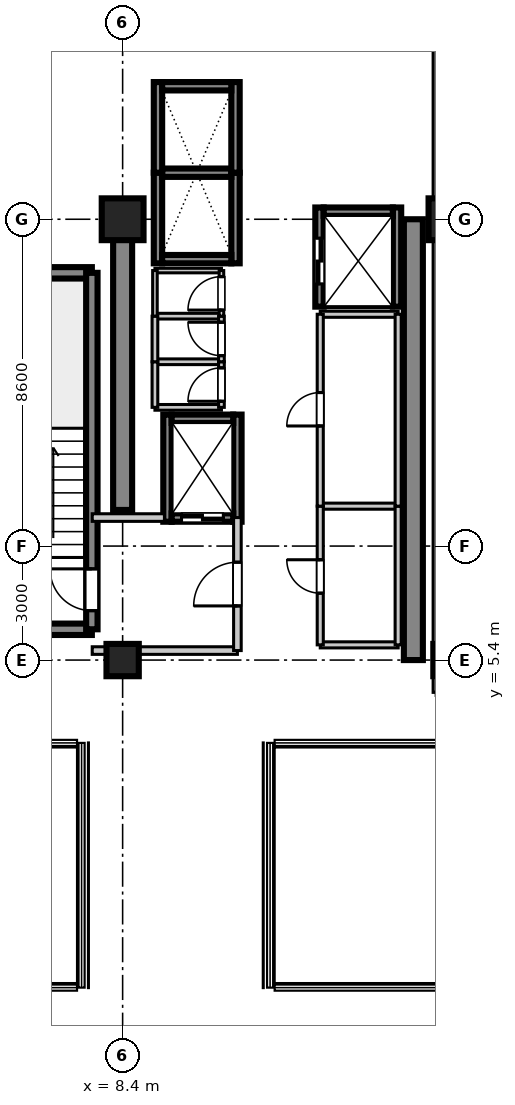
"""IFC4 building model, lengths in metres.
Left out: names, types, materials, properties, quantities, classifications, styles, units other than length and angle.
Written with IfcOpenShell. Run it as: python <this file> out.ifc"""

import sys

from ifc_helpers import new_model, si_unit, direction, frame, frame_2d, origin, origin_2d, place, context, subcontext, project, spatial, rectangle, extrude, source, transform, mapped, element, fill, save


model = new_model("IFC4")
c1 = context("Model", 3, precision=1e-05, world=origin(), true_north=direction((0.0, 1.0)))
c2 = subcontext(c1, "Body", "Model", "MODEL_VIEW")
j1 = project(units=[si_unit("LENGTHUNIT", "METRE"), si_unit("PLANEANGLEUNIT", "RADIAN")], contexts=[c1])
p1 = place(None, origin())
s1 = spatial("IfcSite", under=j1, at=p1, CompositionType="ELEMENT")
p2 = place(p1, origin())
s2 = spatial("IfcBuilding", under=s1, at=p2, CompositionType="ELEMENT")
p3 = place(p2, frame((0.0, 0.0, 178.2)))
s3 = spatial("IfcBuildingStorey", under=s2, at=p3, CompositionType="ELEMENT", Elevation=178.2)
m1 = source(origin(), c2, "Body", "SweptSolid", [
    extrude(rectangle(XDim=0.85, YDim=0.85, at=origin_2d()), origin(), (0.0, 0.0, 1.0), 3.605),
])
p4 = place(p3, frame((8.4, 5.4, 0.0), z_axis=(0.0, 0.0, 1.0), x_axis=(1.0, 0.0, 0.0)))
e1 = element("IfcColumn", 1, at=p4, inside=s3, PredefinedType="PILASTER", context=c2, shape_type="MappedRepresentation", body=[
    mapped(m1, transform((0.0, 0.0, 0.0), scale=1.0)),
])
m2 = source(origin(), c2, "Body", "SweptSolid", [
    extrude(rectangle(XDim=1.1, YDim=1.1, at=origin_2d()), origin(), (0.0, 0.0, 1.0), 3.605),
])
p5 = place(p3, frame((8.4, 17.0, 0.0), z_axis=(0.0, 0.0, 1.0), x_axis=(1.0, 0.0, 0.0)))
e2 = element("IfcColumn", 2, at=p5, inside=s3, PredefinedType="COLUMN", context=c2, shape_type="MappedRepresentation", body=[
    mapped(m2, transform((0.0, 0.0, 0.0), scale=1.0)),
])
p6 = place(p3, frame((17.0, 5.4, 0.0), z_axis=(0.0, 0.0, 1.0), x_axis=(1.0, 0.0, 0.0)))
e3 = element("IfcColumn", 3, at=p6, inside=s3, PredefinedType="PILASTER", context=c2, shape_type="MappedRepresentation", body=[
    mapped(m1, transform((0.0, 0.0, 0.0), scale=1.0)),
])
p7 = place(p3, frame((17.0, 17.0, 0.0), z_axis=(0.0, 0.0, 1.0), x_axis=(1.0, 0.0, 0.0)))
e4 = element("IfcColumn", 4, at=p7, inside=s3, PredefinedType="COLUMN", context=c2, shape_type="MappedRepresentation", body=[
    mapped(m2, transform((0.0, 0.0, 0.0), scale=1.0)),
])
m3 = source(origin(), c2, "Body", "SweptSolid", [
    extrude(rectangle(XDim=7.65, YDim=0.5, at=frame_2d((3.825, 0.0))), origin(), (0.0, 0.0, 1.0), 3.39),
])
p8 = place(p3, frame((8.4, 9.35, 0.0), z_axis=(0.0, 0.0, 1.0), x_axis=(0.0, 1.0, 0.0)))
e5 = element("IfcWall", 5, at=p8, inside=s3, PredefinedType="SHEAR", context=c2, shape_type="MappedRepresentation", body=[
    mapped(m3, transform((0.0, 0.0, 0.0), scale=1.0)),
])
m4 = source(origin(), c2, "Body", "SweptSolid", [
    extrude(rectangle(XDim=11.6, YDim=0.5, at=frame_2d((5.8, 0.0))), origin(), (0.0, 0.0, 1.0), 3.39),
])
p9 = place(p3, frame((16.05, 5.4, 0.0), z_axis=(0.0, 0.0, 1.0), x_axis=(0.0, 1.0, 0.0)))
e6 = element("IfcWall", 6, at=p9, inside=s3, PredefinedType="SHEAR", context=c2, shape_type="MappedRepresentation", body=[
    mapped(m4, transform((0.0, 0.0, 0.0), scale=1.0)),
])
m5 = source(origin(), c2, "Body", "SweptSolid", [
    extrude(rectangle(XDim=3.98, YDim=0.3, at=frame_2d((1.99, 0.0))), origin(), (0.0, 0.0, 1.0), 3.39),
])
for number, where, z_axis, x_axis in (
    (7, (3.61, 6.21, 0.0), (0.0, 0.0, 1.0), (1.0, 0.0, 0.0)),
    (8, (3.61, 15.59, 0.0), (0.0, 0.0, 1.0), (1.0, 0.0, 0.0)),
):
    element("IfcWall", number, at=place(p3, frame(where, z_axis=z_axis, x_axis=x_axis)), inside=s3, PredefinedType="SHEAR", context=c2, shape_type="MappedRepresentation", body=[
        mapped(m5, transform((0.0, 0.0, 0.0), scale=1.0)),
    ])
m6 = source(origin(), c2, "Body", "SweptSolid", [
    extrude(rectangle(XDim=9.38, YDim=0.3, at=frame_2d((4.69, 0.0))), origin(), (0.0, 0.0, 1.0), 3.39),
])
p10 = place(p3, frame((7.59, 6.21, 0.0), z_axis=(0.0, 0.0, 1.0), x_axis=(0.0, 1.0, 0.0)))
e9 = element("IfcWall", 9, at=p10, inside=s3, PredefinedType="SHEAR", context=c2, shape_type="MappedRepresentation", body=[
    mapped(m6, transform((0.0, 0.0, 0.0), scale=1.0)),
])
p11 = place(p10, frame((0.49, 0.0, 0.0)))
e10 = element("IfcOpeningElement", 10, at=p11, cuts=e9, PredefinedType="OPENING", context=c2, shape_type="SweptSolid", body=[
    extrude(rectangle(XDim=1.1, YDim=2.15, at=frame_2d((0.55, 1.075))), frame((0.0, 0.16, 0.0), z_axis=(0.0, -1.0, 0.0), x_axis=(1.0, 0.0, 0.0)), (0.0, 0.0, 1.0), 0.32),
])
m7 = source(origin(), c2, "Body", "SweptSolid", [
    extrude(rectangle(XDim=2.385, YDim=0.22, at=frame_2d((1.192, 0.0))), origin(), (0.0, 0.0, 1.0), 3.39),
])
for number, where, z_axis, x_axis in (
    (11, (9.33, 15.84, 0.0), (0.0, 0.0, 1.0), (0.0, 1.0, 0.0)),
    (12, (11.37, 15.84, 0.0), (0.0, 0.0, 1.0), (0.0, 1.0, 0.0)),
):
    element("IfcWall", number, at=place(p3, frame(where, z_axis=z_axis, x_axis=x_axis)), inside=s3, PredefinedType="SHEAR", context=c2, shape_type="MappedRepresentation", body=[
        mapped(m7, transform((0.0, 0.0, 0.0), scale=1.0)),
    ])
m8 = source(origin(), c2, "Body", "SweptSolid", [
    extrude(rectangle(XDim=1.82, YDim=0.22, at=frame_2d((0.91, 0.0))), origin(), (0.0, 0.0, 1.0), 3.39),
])
p12 = place(p3, frame((9.44, 15.95, 0.0), z_axis=(0.0, 0.0, 1.0), x_axis=(1.0, 0.0, 0.0)))
e13 = element("IfcWall", 13, at=p12, inside=s3, PredefinedType="SHEAR", context=c2, shape_type="MappedRepresentation", body=[
    mapped(m8, transform((0.0, 0.0, 0.0), scale=1.0)),
])
m9 = source(origin(), c2, "Body", "SweptSolid", [
    extrude(rectangle(XDim=1.82, YDim=0.22, at=frame_2d((0.91, 0.0))), origin(), (0.0, 0.0, 1.0), 3.65),
])
p13 = place(p3, frame((9.44, 18.225, 0.0), z_axis=(0.0, 0.0, 1.0), x_axis=(1.0, 0.0, 0.0)))
e14 = element("IfcWall", 14, at=p13, inside=s3, PredefinedType="SHEAR", context=c2, shape_type="MappedRepresentation", body=[
    mapped(m9, transform((0.0, 0.0, 0.0), scale=1.0)),
])
for number, where, z_axis, x_axis in (
    (15, (9.33, 18.225, 0.0), (0.0, 0.0, 1.0), (0.0, 1.0, 0.0)),
    (16, (11.37, 18.225, 0.0), (0.0, 0.0, 1.0), (0.0, 1.0, 0.0)),
):
    element("IfcWall", number, at=place(p3, frame(where, z_axis=z_axis, x_axis=x_axis)), inside=s3, PredefinedType="SHEAR", context=c2, shape_type="MappedRepresentation", body=[
        mapped(m7, transform((0.0, 0.0, 0.0), scale=1.0)),
    ])
p14 = place(p3, frame((9.44, 20.5, 0.0), z_axis=(0.0, 0.0, 1.0), x_axis=(1.0, 0.0, 0.0)))
e17 = element("IfcWall", 17, at=p14, inside=s3, PredefinedType="SHEAR", context=c2, shape_type="MappedRepresentation", body=[
    mapped(m8, transform((0.0, 0.0, 0.0), scale=1.0)),
])
m10 = source(origin(), c2, "Body", "SweptSolid", [
    extrude(rectangle(XDim=2.82, YDim=0.22, at=frame_2d((1.41, 0.0))), origin(), (0.0, 0.0, 1.0), 3.39),
])
for number, where, z_axis, x_axis in (
    (18, (9.58, 9.04, 0.0), (0.0, 0.0, 1.0), (0.0, 1.0, 0.0)),
    (19, (11.42, 9.04, 0.0), (0.0, 0.0, 1.0), (0.0, 1.0, 0.0)),
):
    element("IfcWall", number, at=place(p3, frame(where, z_axis=z_axis, x_axis=x_axis)), inside=s3, PredefinedType="SHEAR", context=c2, shape_type="MappedRepresentation", body=[
        mapped(m10, transform((0.0, 0.0, 0.0), scale=1.0)),
    ])
m11 = source(origin(), c2, "Body", "SweptSolid", [
    extrude(rectangle(XDim=1.62, YDim=0.22, at=frame_2d((0.81, 0.0))), origin(), (0.0, 0.0, 1.0), 3.39),
])
p15 = place(p3, frame((9.69, 9.15, 0.0), z_axis=(0.0, 0.0, 1.0), x_axis=(1.0, 0.0, 0.0)))
e20 = element("IfcWall", 20, at=p15, inside=s3, PredefinedType="SHEAR", context=c2, shape_type="MappedRepresentation", body=[
    mapped(m11, transform((0.0, 0.0, 0.0), scale=1.0)),
])
p16 = place(p15, frame((0.26, 0.0, 0.0)))
e21 = element("IfcOpeningElement", 21, at=p16, cuts=e20, PredefinedType="OPENING", context=c2, shape_type="SweptSolid", body=[
    extrude(rectangle(XDim=1.1, YDim=2.2, at=frame_2d((0.55, 1.1))), frame((0.0, 0.12, 0.0), z_axis=(0.0, -1.0, 0.0), x_axis=(1.0, 0.0, 0.0)), (0.0, 0.0, 1.0), 0.24),
])
p17 = place(p3, frame((9.69, 11.75, 0.0), z_axis=(0.0, 0.0, 1.0), x_axis=(1.0, 0.0, 0.0)))
e22 = element("IfcWall", 22, at=p17, inside=s3, PredefinedType="SHEAR", context=c2, shape_type="MappedRepresentation", body=[
    mapped(m11, transform((0.0, 0.0, 0.0), scale=1.0)),
])
m12 = source(origin(), c2, "Body", "SweptSolid", [
    extrude(rectangle(XDim=2.61, YDim=0.22, at=frame_2d((1.305, 0.0))), origin(), (0.0, 0.0, 1.0), 3.39),
])
p18 = place(p3, frame((13.58, 14.7, 0.0), z_axis=(0.0, 0.0, 1.0), x_axis=(0.0, 1.0, 0.0)))
e23 = element("IfcWall", 23, at=p18, inside=s3, PredefinedType="SHEAR", context=c2, shape_type="MappedRepresentation", body=[
    mapped(m12, transform((0.0, 0.0, 0.0), scale=1.0)),
])
p19 = place(p18, frame((0.6, 0.0, 0.0)))
e24 = element("IfcOpeningElement", 24, at=p19, cuts=e23, PredefinedType="OPENING", context=c2, shape_type="SweptSolid", body=[
    extrude(rectangle(XDim=1.2, YDim=2.2, at=frame_2d((0.6, 1.1))), frame((0.0, 0.12, 0.0), z_axis=(0.0, -1.0, 0.0), x_axis=(1.0, 0.0, 0.0)), (0.0, 0.0, 1.0), 0.24),
])
p20 = place(p3, frame((15.62, 14.7, 0.0), z_axis=(0.0, 0.0, 1.0), x_axis=(0.0, 1.0, 0.0)))
e25 = element("IfcWall", 25, at=p20, inside=s3, PredefinedType="SHEAR", context=c2, shape_type="MappedRepresentation", body=[
    mapped(m12, transform((0.0, 0.0, 0.0), scale=1.0)),
])
p21 = place(p3, frame((13.69, 17.2, 0.0), z_axis=(0.0, 0.0, 1.0), x_axis=(1.0, 0.0, 0.0)))
e26 = element("IfcWall", 26, at=p21, inside=s3, PredefinedType="SHEAR", context=c2, shape_type="MappedRepresentation", body=[
    mapped(m8, transform((0.0, 0.0, 0.0), scale=1.0)),
])
m13 = source(origin(), c2, "Body", "SweptSolid", [
    extrude(rectangle(XDim=3.82, YDim=0.2, at=frame_2d((1.91, 0.0))), origin(), (0.0, 0.0, 1.0), 2.73),
])
p22 = place(p3, frame((7.6, 5.65, 0.0), z_axis=(0.0, 0.0, 1.0), x_axis=(1.0, 0.0, 0.0)))
e27 = element("IfcWall", 27, at=p22, inside=s3, PredefinedType="PARTITIONING", context=c2, shape_type="MappedRepresentation", body=[
    mapped(m13, transform((0.0, 0.0, 0.0), scale=1.0)),
])
m14 = source(origin(), c2, "Body", "SweptSolid", [
    extrude(rectangle(XDim=1.9, YDim=0.2, at=frame_2d((0.95, 0.0))), origin(), (0.0, 0.0, 1.0), 2.73),
])
p23 = place(p3, frame((7.6, 9.15, 0.0), z_axis=(0.0, 0.0, 1.0), x_axis=(1.0, 0.0, 0.0)))
e28 = element("IfcWall", 28, at=p23, inside=s3, PredefinedType="PARTITIONING", context=c2, shape_type="MappedRepresentation", body=[
    mapped(m14, transform((0.0, 0.0, 0.0), scale=1.0)),
])
m15 = source(origin(), c2, "Body", "SweptSolid", [
    extrude(rectangle(XDim=3.5, YDim=0.2, at=frame_2d((1.75, 0.0))), origin(), (0.0, 0.0, 1.0), 2.73),
])
p24 = place(p3, frame((11.42, 5.65, 0.0), z_axis=(0.0, 0.0, 1.0), x_axis=(0.0, 1.0, 0.0)))
e29 = element("IfcWall", 29, at=p24, inside=s3, PredefinedType="PARTITIONING", context=c2, shape_type="MappedRepresentation", body=[
    mapped(m15, transform((0.0, 0.0, 0.0), scale=1.0)),
])
p25 = place(p24, frame((1.175, 0.0, 0.0)))
e30 = element("IfcOpeningElement", 30, at=p25, cuts=e29, PredefinedType="OPENING", context=c2, shape_type="SweptSolid", body=[
    extrude(rectangle(XDim=1.15, YDim=2.15, at=frame_2d((0.575, 1.075))), frame((0.0, 0.11, 0.0), z_axis=(0.0, -1.0, 0.0), x_axis=(1.0, 0.0, 0.0)), (0.0, 0.0, 1.0), 0.22),
])
m16 = source(origin(), c2, "Body", "SweptSolid", [
    extrude(rectangle(XDim=1.75, YDim=0.15, at=frame_2d((0.875, 0.0))), origin(), (0.0, 0.0, 1.0), 2.73),
])
for number, where, z_axis, x_axis in (
    (31, (9.25, 12.05, 0.0), (0.0, 0.0, 1.0), (1.0, 0.0, 0.0)),
    (32, (9.25, 13.25, 0.0), (0.0, 0.0, 1.0), (1.0, 0.0, 0.0)),
):
    element("IfcWall", number, at=place(p3, frame(where, z_axis=z_axis, x_axis=x_axis)), inside=s3, PredefinedType="PARTITIONING", context=c2, shape_type="MappedRepresentation", body=[
        mapped(m16, transform((0.0, 0.0, 0.0), scale=1.0)),
    ])
m17 = source(origin(), c2, "Body", "SweptSolid", [
    extrude(rectangle(XDim=1.2, YDim=0.15, at=frame_2d((0.6, 0.0))), origin(), (0.0, 0.0, 1.0), 2.73),
])
p26 = place(p3, frame((9.25, 12.05, 0.0), z_axis=(0.0, 0.0, 1.0), x_axis=(0.0, 1.0, 0.0)))
e33 = element("IfcWall", 33, at=p26, inside=s3, PredefinedType="PARTITIONING", context=c2, shape_type="MappedRepresentation", body=[
    mapped(m17, transform((0.0, 0.0, 0.0), scale=1.0)),
])
p27 = place(p3, frame((11.0, 12.05, 0.0), z_axis=(0.0, 0.0, 1.0), x_axis=(0.0, 1.0, 0.0)))
e34 = element("IfcWall", 34, at=p27, inside=s3, PredefinedType="PARTITIONING", context=c2, shape_type="MappedRepresentation", body=[
    mapped(m17, transform((0.0, 0.0, 0.0), scale=1.0)),
])
p28 = place(p27, frame((0.16, 0.0, 0.0)))
e35 = element("IfcOpeningElement", 35, at=p28, cuts=e34, PredefinedType="OPENING", context=c2, shape_type="SweptSolid", body=[
    extrude(rectangle(XDim=0.88, YDim=2.1, at=frame_2d((0.44, 1.05))), frame((0.0, 0.085, 0.0), z_axis=(0.0, -1.0, 0.0), x_axis=(1.0, 0.0, 0.0)), (0.0, 0.0, 1.0), 0.17),
])
p29 = place(p3, frame((9.25, 14.45, 0.0), z_axis=(0.0, 0.0, 1.0), x_axis=(1.0, 0.0, 0.0)))
e36 = element("IfcWall", 36, at=p29, inside=s3, PredefinedType="PARTITIONING", context=c2, shape_type="MappedRepresentation", body=[
    mapped(m16, transform((0.0, 0.0, 0.0), scale=1.0)),
])
p30 = place(p3, frame((9.25, 13.25, 0.0), z_axis=(0.0, 0.0, 1.0), x_axis=(0.0, 1.0, 0.0)))
e37 = element("IfcWall", 37, at=p30, inside=s3, PredefinedType="PARTITIONING", context=c2, shape_type="MappedRepresentation", body=[
    mapped(m17, transform((0.0, 0.0, 0.0), scale=1.0)),
])
p31 = place(p3, frame((11.0, 13.25, 0.0), z_axis=(0.0, 0.0, 1.0), x_axis=(0.0, 1.0, 0.0)))
e38 = element("IfcWall", 38, at=p31, inside=s3, PredefinedType="PARTITIONING", context=c2, shape_type="MappedRepresentation", body=[
    mapped(m17, transform((0.0, 0.0, 0.0), scale=1.0)),
])
p32 = place(p31, frame((0.16, 0.0, 0.0)))
e39 = element("IfcOpeningElement", 39, at=p32, cuts=e38, PredefinedType="OPENING", context=c2, shape_type="SweptSolid", body=[
    extrude(rectangle(XDim=0.88, YDim=2.1, at=frame_2d((0.44, 1.05))), frame((0.0, 0.085, 0.0), z_axis=(0.0, -1.0, 0.0), x_axis=(1.0, 0.0, 0.0)), (0.0, 0.0, 1.0), 0.17),
])
m18 = source(origin(), c2, "Body", "SweptSolid", [
    extrude(rectangle(XDim=1.75, YDim=0.12, at=frame_2d((0.875, 0.0))), origin(), (0.0, 0.0, 1.0), 2.73),
])
p33 = place(p3, frame((9.25, 15.65, 0.0), z_axis=(0.0, 0.0, 1.0), x_axis=(1.0, 0.0, 0.0)))
e40 = element("IfcWall", 40, at=p33, inside=s3, PredefinedType="PARTITIONING", context=c2, shape_type="MappedRepresentation", body=[
    mapped(m18, transform((0.0, 0.0, 0.0), scale=1.0)),
])
m19 = source(origin(), c2, "Body", "SweptSolid", [
    extrude(rectangle(XDim=1.2, YDim=0.12, at=frame_2d((0.6, 0.0))), origin(), (0.0, 0.0, 1.0), 2.73),
])
p34 = place(p3, frame((9.25, 14.45, 0.0), z_axis=(0.0, 0.0, 1.0), x_axis=(0.0, 1.0, 0.0)))
e41 = element("IfcWall", 41, at=p34, inside=s3, PredefinedType="PARTITIONING", context=c2, shape_type="MappedRepresentation", body=[
    mapped(m19, transform((0.0, 0.0, 0.0), scale=1.0)),
])
p35 = place(p3, frame((11.0, 14.45, 0.0), z_axis=(0.0, 0.0, 1.0), x_axis=(0.0, 1.0, 0.0)))
e42 = element("IfcWall", 42, at=p35, inside=s3, PredefinedType="PARTITIONING", context=c2, shape_type="MappedRepresentation", body=[
    mapped(m19, transform((0.0, 0.0, 0.0), scale=1.0)),
])
p36 = place(p35, frame((0.16, 0.0, 0.0)))
e43 = element("IfcOpeningElement", 43, at=p36, cuts=e42, PredefinedType="OPENING", context=c2, shape_type="SweptSolid", body=[
    extrude(rectangle(XDim=0.88, YDim=2.1, at=frame_2d((0.44, 1.05))), frame((0.0, 0.07, 0.0), z_axis=(0.0, -1.0, 0.0), x_axis=(1.0, 0.0, 0.0)), (0.0, 0.0, 1.0), 0.14),
])
m20 = source(origin(), c2, "Body", "SweptSolid", [
    extrude(rectangle(XDim=2.05, YDim=0.16, at=frame_2d((1.025, 0.0))), origin(), (0.0, 0.0, 1.0), 2.73),
])
for number, where, z_axis, x_axis in (
    (44, (13.6, 5.8, 0.0), (0.0, 0.0, 1.0), (1.0, 0.0, 0.0)),
    (45, (13.6, 9.45, 0.0), (0.0, 0.0, 1.0), (1.0, 0.0, 0.0)),
):
    element("IfcWall", number, at=place(p3, frame(where, z_axis=z_axis, x_axis=x_axis)), inside=s3, PredefinedType="PARTITIONING", context=c2, shape_type="MappedRepresentation", body=[
        mapped(m20, transform((0.0, 0.0, 0.0), scale=1.0)),
    ])
m21 = source(origin(), c2, "Body", "SweptSolid", [
    extrude(rectangle(XDim=3.65, YDim=0.16, at=frame_2d((1.825, 0.0))), origin(), (0.0, 0.0, 1.0), 2.73),
])
p37 = place(p3, frame((13.6, 5.8, 0.0), z_axis=(0.0, 0.0, 1.0), x_axis=(0.0, 1.0, 0.0)))
e46 = element("IfcWall", 46, at=p37, inside=s3, PredefinedType="PARTITIONING", context=c2, shape_type="MappedRepresentation", body=[
    mapped(m21, transform((0.0, 0.0, 0.0), scale=1.0)),
])
p38 = place(p37, frame((1.36, 0.0, 0.0)))
e47 = element("IfcOpeningElement", 47, at=p38, cuts=e46, PredefinedType="OPENING", context=c2, shape_type="SweptSolid", body=[
    extrude(rectangle(XDim=0.88, YDim=2.1, at=frame_2d((0.44, 1.05))), frame((0.0, 0.09, 0.0), z_axis=(0.0, -1.0, 0.0), x_axis=(1.0, 0.0, 0.0)), (0.0, 0.0, 1.0), 0.18),
])
p39 = place(p3, frame((15.65, 5.8, 0.0), z_axis=(0.0, 0.0, 1.0), x_axis=(0.0, 1.0, 0.0)))
e48 = element("IfcWall", 48, at=p39, inside=s3, PredefinedType="PARTITIONING", context=c2, shape_type="MappedRepresentation", body=[
    mapped(m21, transform((0.0, 0.0, 0.0), scale=1.0)),
])
p40 = place(p3, frame((13.6, 14.5, 0.0), z_axis=(0.0, 0.0, 1.0), x_axis=(1.0, 0.0, 0.0)))
e49 = element("IfcWall", 49, at=p40, inside=s3, PredefinedType="PARTITIONING", context=c2, shape_type="MappedRepresentation", body=[
    mapped(m20, transform((0.0, 0.0, 0.0), scale=1.0)),
])
m22 = source(origin(), c2, "Body", "SweptSolid", [
    extrude(rectangle(XDim=5.05, YDim=0.16, at=frame_2d((2.525, 0.0))), origin(), (0.0, 0.0, 1.0), 2.73),
])
p41 = place(p3, frame((13.6, 9.45, 0.0), z_axis=(0.0, 0.0, 1.0), x_axis=(0.0, 1.0, 0.0)))
e50 = element("IfcWall", 50, at=p41, inside=s3, PredefinedType="PARTITIONING", context=c2, shape_type="MappedRepresentation", body=[
    mapped(m22, transform((0.0, 0.0, 0.0), scale=1.0)),
])
p42 = place(p41, frame((2.11, 0.0, 0.0)))
e51 = element("IfcOpeningElement", 51, at=p42, cuts=e50, PredefinedType="OPENING", context=c2, shape_type="SweptSolid", body=[
    extrude(rectangle(XDim=0.88, YDim=2.1, at=frame_2d((0.44, 1.05))), frame((0.0, 0.09, 0.0), z_axis=(0.0, -1.0, 0.0), x_axis=(1.0, 0.0, 0.0)), (0.0, 0.0, 1.0), 0.18),
])
p43 = place(p3, frame((15.65, 9.45, 0.0), z_axis=(0.0, 0.0, 1.0), x_axis=(0.0, 1.0, 0.0)))
e52 = element("IfcWall", 52, at=p43, inside=s3, PredefinedType="PARTITIONING", context=c2, shape_type="MappedRepresentation", body=[
    mapped(m22, transform((0.0, 0.0, 0.0), scale=1.0)),
])
m23 = source(origin(), c2, "Body", "SweptSolid", [
    extrude(rectangle(XDim=17.95, YDim=0.16, at=frame_2d((8.975, 0.0))), origin(), (0.0, 0.0, 1.0), 2.73),
])
p44 = place(p3, frame((16.65, 4.55, 0.0), z_axis=(0.0, 0.0, 1.0), x_axis=(0.0, 1.0, 0.0)))
e53 = element("IfcWall", 53, at=p44, inside=s3, PredefinedType="PARTITIONING", context=c2, shape_type="MappedRepresentation", body=[
    mapped(m23, transform((0.0, 0.0, 0.0), scale=1.0)),
])
m24 = source(origin(), c2, "Body", "SweptSolid", [
    extrude(rectangle(XDim=1.1, YDim=2.15, at=frame_2d((0.55, 1.075))), frame((0.0, 0.025, 0.0), z_axis=(0.0, -1.0, 0.0), x_axis=(1.0, 0.0, 0.0)), (0.0, 0.0, 1.0), 0.05),
])
p45 = place(p11, origin())
e54 = element("IfcDoor", 54, at=p45, inside=s3, OperationType="SINGLE_SWING_RIGHT", PredefinedType="DOOR", context=c2, shape_type="MappedRepresentation", body=[
    mapped(m24, transform((0.0, 0.0, 0.0), scale=1.0)),
])
fill(e10, e54)
m25 = source(origin(), c2, "Body", "SweptSolid", [
    extrude(rectangle(XDim=1.1, YDim=2.2, at=frame_2d((0.55, 1.1))), frame((0.0, 0.025, 0.0), z_axis=(0.0, -1.0, 0.0), x_axis=(1.0, 0.0, 0.0)), (0.0, 0.0, 1.0), 0.05),
])
p46 = place(p16, frame((1.1, 0.0, 0.0), z_axis=(0.0, 0.0, 1.0), x_axis=(-1.0, 0.0, 0.0)))
e55 = element("IfcDoor", 55, at=p46, inside=s3, OperationType="DOUBLE_DOOR_SLIDING", PredefinedType="DOOR", context=c2, shape_type="MappedRepresentation", body=[
    mapped(m25, transform((0.0, 0.0, 0.0), scale=1.0)),
])
fill(e21, e55)
m26 = source(origin(), c2, "Body", "SweptSolid", [
    extrude(rectangle(XDim=1.2, YDim=2.2, at=frame_2d((0.6, 1.1))), frame((0.0, 0.025, 0.0), z_axis=(0.0, -1.0, 0.0), x_axis=(1.0, 0.0, 0.0)), (0.0, 0.0, 1.0), 0.05),
])
p47 = place(p19, origin())
e56 = element("IfcDoor", 56, at=p47, inside=s3, OperationType="DOUBLE_DOOR_SLIDING", PredefinedType="DOOR", context=c2, shape_type="MappedRepresentation", body=[
    mapped(m26, transform((0.0, 0.0, 0.0), scale=1.0)),
])
fill(e24, e56)
m27 = source(origin(), c2, "Body", "SweptSolid", [
    extrude(rectangle(XDim=1.15, YDim=2.15, at=frame_2d((0.575, 1.075))), frame((0.0, 0.025, 0.0), z_axis=(0.0, -1.0, 0.0), x_axis=(1.0, 0.0, 0.0)), (0.0, 0.0, 1.0), 0.05),
])
p48 = place(p25, frame((1.15, 0.0, 0.0), z_axis=(0.0, 0.0, 1.0), x_axis=(-1.0, 0.0, 0.0)))
e57 = element("IfcDoor", 57, at=p48, inside=s3, OperationType="SINGLE_SWING_LEFT", PredefinedType="DOOR", context=c2, shape_type="MappedRepresentation", body=[
    mapped(m27, transform((0.0, 0.0, 0.0), scale=1.0)),
])
fill(e30, e57)
m28 = source(origin(), c2, "Body", "SweptSolid", [
    extrude(rectangle(XDim=0.88, YDim=2.1, at=frame_2d((0.44, 1.05))), frame((0.0, 0.025, 0.0), z_axis=(0.0, -1.0, 0.0), x_axis=(1.0, 0.0, 0.0)), (0.0, 0.0, 1.0), 0.05),
])
p49 = place(p28, origin())
e58 = element("IfcDoor", 58, at=p49, inside=s3, OperationType="SINGLE_SWING_LEFT", PredefinedType="DOOR", context=c2, shape_type="MappedRepresentation", body=[
    mapped(m28, transform((0.0, 0.0, 0.0), scale=1.0)),
])
fill(e35, e58)
p50 = place(p32, origin())
e59 = element("IfcDoor", 59, at=p50, inside=s3, OperationType="SINGLE_SWING_RIGHT", PredefinedType="DOOR", context=c2, shape_type="MappedRepresentation", body=[
    mapped(m28, transform((0.0, 0.0, 0.0), scale=1.0)),
])
fill(e39, e59)
p51 = place(p36, origin())
e60 = element("IfcDoor", 60, at=p51, inside=s3, OperationType="SINGLE_SWING_LEFT", PredefinedType="DOOR", context=c2, shape_type="MappedRepresentation", body=[
    mapped(m28, transform((0.0, 0.0, 0.0), scale=1.0)),
])
fill(e43, e60)
p52 = place(p38, frame((0.88, 0.0, 0.0), z_axis=(0.0, 0.0, 1.0), x_axis=(-1.0, 0.0, 0.0)))
e61 = element("IfcDoor", 61, at=p52, inside=s3, OperationType="SINGLE_SWING_RIGHT", PredefinedType="DOOR", context=c2, shape_type="MappedRepresentation", body=[
    mapped(m28, transform((0.0, 0.0, 0.0), scale=1.0)),
])
fill(e47, e61)
p53 = place(p42, frame((0.88, 0.0, 0.0), z_axis=(0.0, 0.0, 1.0), x_axis=(-1.0, 0.0, 0.0)))
e62 = element("IfcDoor", 62, at=p53, inside=s3, OperationType="SINGLE_SWING_LEFT", PredefinedType="DOOR", context=c2, shape_type="MappedRepresentation", body=[
    mapped(m28, transform((0.0, 0.0, 0.0), scale=1.0)),
])
fill(e51, e62)
save(model, sys.argv[1])
